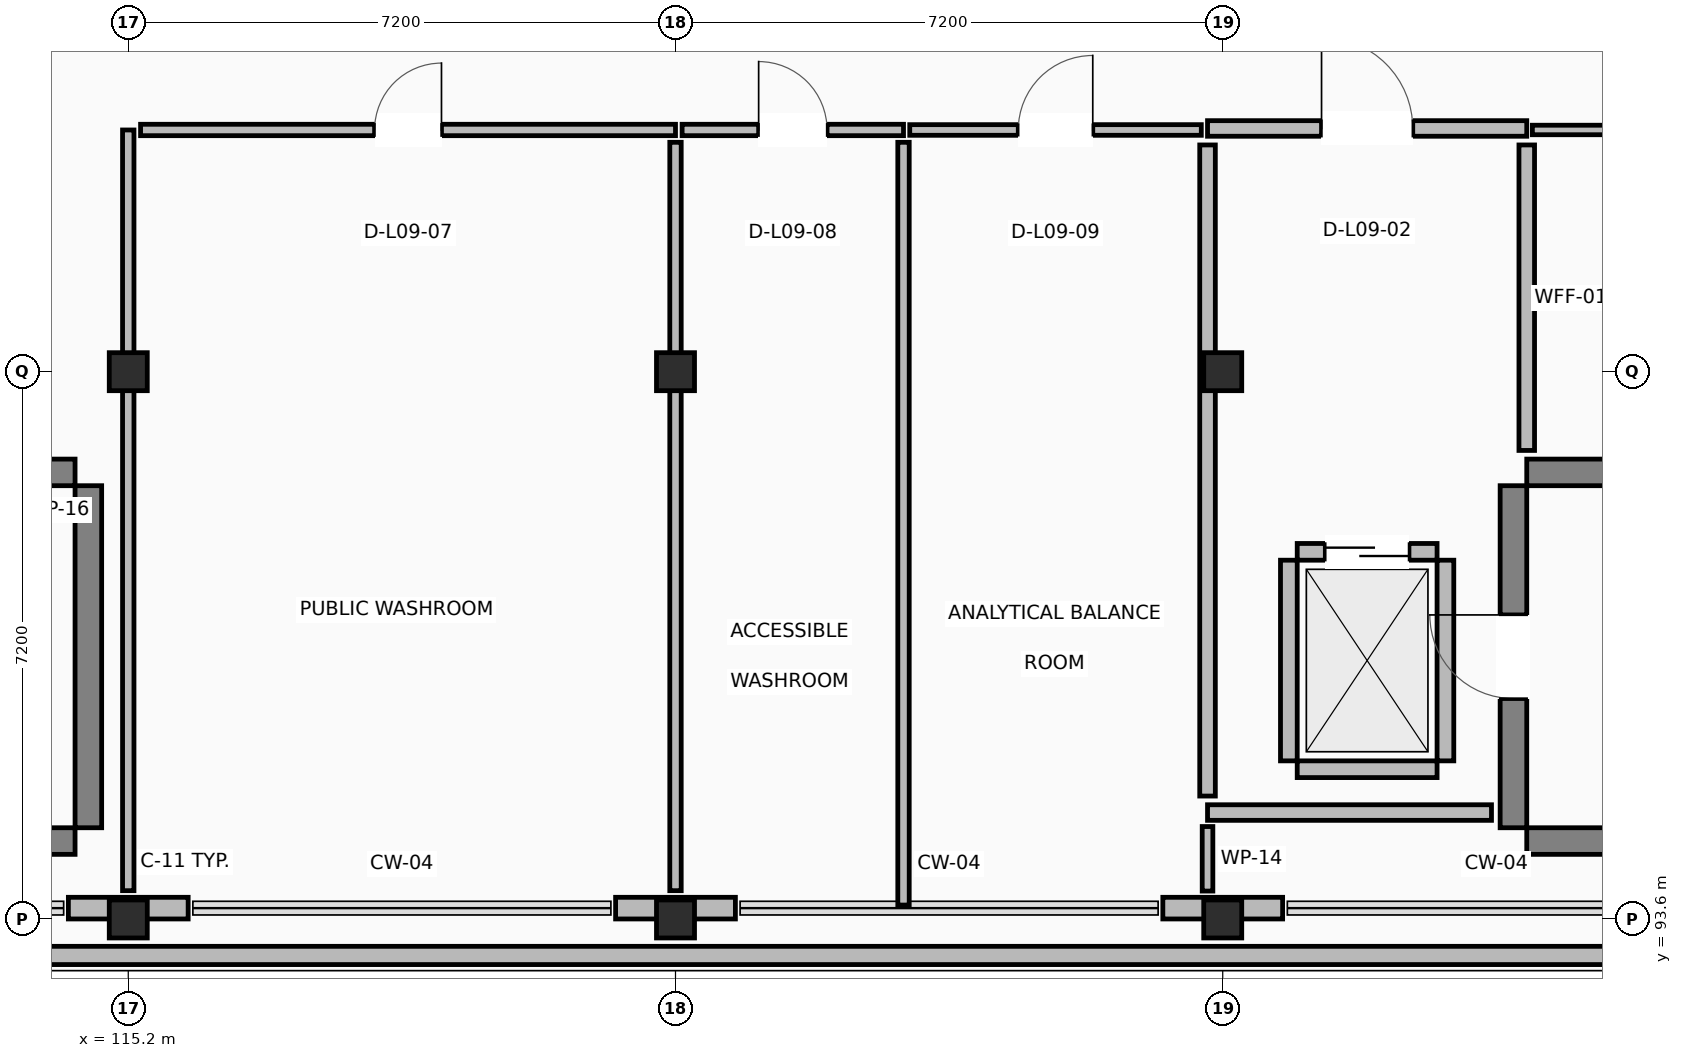
"""IFC4 building model, lengths in metres.
Left out: names, types, materials, properties, quantities, classifications, styles, units other than length and angle.
Written with IfcOpenShell. Run it as: python <this file> out.ifc"""

import sys

from ifc_helpers import new_model, si_unit, direction, frame, frame_2d, origin, origin_2d, place, context, subcontext, project, spatial, rectangle, extrude, element, fill, save


model = new_model("IFC4")
c1 = context("Model", 3, precision=1e-05, world=origin(), true_north=direction((0.0, 1.0)))
c2 = subcontext(c1, "Body", "Model", "MODEL_VIEW")
j1 = project(units=[si_unit("LENGTHUNIT", "METRE"), si_unit("PLANEANGLEUNIT", "RADIAN")], contexts=[c1])
p1 = place(None, origin())
s1 = spatial("IfcSite", under=j1, at=p1, CompositionType="ELEMENT")
p2 = place(p1, origin())
s2 = spatial("IfcBuilding", under=s1, at=p2, CompositionType="ELEMENT")
p3 = place(p2, frame((0.0, 0.0, 39.6)))
s3 = spatial("IfcBuildingStorey", under=s2, at=p3, CompositionType="ELEMENT", Elevation=39.6)
for number, where, z_axis, x_axis in (
    (1, (115.2, 93.6, 0.0), (0.0, 0.0, 1.0), (1.0, 0.0, 0.0)),
    (2, (115.2, 100.8, 0.0), (0.0, 0.0, 1.0), (1.0, 0.0, 0.0)),
    (3, (122.4, 93.6, 0.0), (0.0, 0.0, 1.0), (1.0, 0.0, 0.0)),
    (4, (122.4, 100.8, 0.0), (0.0, 0.0, 1.0), (1.0, 0.0, 0.0)),
    (5, (129.6, 93.6, 0.0), (0.0, 0.0, 1.0), (1.0, 0.0, 0.0)),
    (6, (129.6, 100.8, 0.0), (0.0, 0.0, 1.0), (1.0, 0.0, 0.0)),
):
    element("IfcColumn", number, at=place(p3, frame(where, z_axis=z_axis, x_axis=x_axis)), inside=s3, PredefinedType="COLUMN", context=c2, shape_type="SweptSolid", body=[
        extrude(rectangle(XDim=0.5, YDim=0.5, at=origin_2d()), origin(), (0.0, 0.0, 1.0), 3.92),
    ])
for number, where, z_axis, x_axis in (
    (7, (105.0, 94.625, 0.0), (0.0, 0.0, 1.0), (1.0, 0.0, 0.0)),
    (8, (105.0, 99.475, 0.0), (0.0, 0.0, 1.0), (1.0, 0.0, 0.0)),
):
    element("IfcWall", number, at=place(p3, frame(where, z_axis=z_axis, x_axis=x_axis)), inside=s3, PredefinedType="SHEAR", context=c2, shape_type="SweptSolid", body=[
        extrude(rectangle(XDim=9.5, YDim=0.35, at=frame_2d((4.75, 0.0))), origin(), (0.0, 0.0, 1.0), 3.92),
    ])
p4 = place(p3, frame((114.675, 94.8, 0.0), z_axis=(0.0, 0.0, 1.0), x_axis=(0.0, 1.0, 0.0)))
e9 = element("IfcWall", 9, at=p4, inside=s3, PredefinedType="SHEAR", context=c2, shape_type="SweptSolid", body=[
    extrude(rectangle(XDim=4.5, YDim=0.35, at=frame_2d((2.25, 0.0))), origin(), (0.0, 0.0, 1.0), 3.92),
])
for number, where, z_axis, x_axis in (
    (10, (133.6, 94.625, 0.0), (0.0, 0.0, 1.0), (1.0, 0.0, 0.0)),
    (11, (133.6, 99.475, 0.0), (0.0, 0.0, 1.0), (1.0, 0.0, 0.0)),
):
    element("IfcWall", number, at=place(p3, frame(where, z_axis=z_axis, x_axis=x_axis)), inside=s3, PredefinedType="SHEAR", context=c2, shape_type="SweptSolid", body=[
        extrude(rectangle(XDim=9.5, YDim=0.35, at=frame_2d((4.75, 0.0))), origin(), (0.0, 0.0, 1.0), 3.92),
    ])
p5 = place(p3, frame((133.425, 94.8, 0.0), z_axis=(0.0, 0.0, 1.0), x_axis=(0.0, 1.0, 0.0)))
e12 = element("IfcWall", 12, at=p5, inside=s3, PredefinedType="SHEAR", context=c2, shape_type="SweptSolid", body=[
    extrude(rectangle(XDim=4.5, YDim=0.35, at=frame_2d((2.25, 0.0))), origin(), (0.0, 0.0, 1.0), 3.92),
])
p6 = place(p5, frame((1.7, 0.0, 0.0)))
e13 = element("IfcOpeningElement", 13, at=p6, cuts=e12, PredefinedType="OPENING", context=c2, shape_type="SweptSolid", body=[
    extrude(rectangle(XDim=1.1, YDim=2.15, at=frame_2d((0.55, 1.075))), frame((0.0, 0.185, 0.0), z_axis=(0.0, -1.0, 0.0), x_axis=(1.0, 0.0, 0.0)), (0.0, 0.0, 1.0), 0.37),
])
for number, where, z_axis, x_axis in (
    (14, (114.412, 93.742, 0.0), (0.0, 0.0, 1.0), (1.0, 0.0, 0.0)),
    (15, (121.612, 93.742, 0.0), (0.0, 0.0, 1.0), (1.0, 0.0, 0.0)),
    (16, (128.812, 93.742, 0.0), (0.0, 0.0, 1.0), (1.0, 0.0, 0.0)),
):
    element("IfcWall", number, at=place(p3, frame(where, z_axis=z_axis, x_axis=x_axis)), inside=s3, PredefinedType="STANDARD", context=c2, shape_type="SweptSolid", body=[
        extrude(rectangle(XDim=1.576, YDim=0.285, at=frame_2d((0.788, 0.0))), origin(), (0.0, 0.0, 1.0), 2.96),
    ])
p7 = place(p3, frame((136.44, 93.12, 0.0), z_axis=(0.0, 0.0, 1.0), x_axis=(-1.0, 0.0, 0.0)))
e17 = element("IfcWall", 17, at=p7, inside=s3, PredefinedType="PARAPET", context=c2, shape_type="SweptSolid", body=[
    extrude(rectangle(XDim=42.28, YDim=0.24, at=frame_2d((21.14, 0.0))), origin(), (0.0, 0.0, 1.0), 1.12),
])
p8 = place(p3, frame((130.58, 95.57, 0.0), z_axis=(0.0, 0.0, 1.0), x_axis=(1.0, 0.0, 0.0)))
e18 = element("IfcWall", 18, at=p8, inside=s3, PredefinedType="STANDARD", context=c2, shape_type="SweptSolid", body=[
    extrude(rectangle(XDim=1.84, YDim=0.22, at=frame_2d((0.92, 0.0))), origin(), (0.0, 0.0, 1.0), 2.96),
])
p9 = place(p3, frame((130.58, 98.43, 0.0), z_axis=(0.0, 0.0, 1.0), x_axis=(1.0, 0.0, 0.0)))
e19 = element("IfcWall", 19, at=p9, inside=s3, PredefinedType="STANDARD", context=c2, shape_type="SweptSolid", body=[
    extrude(rectangle(XDim=1.84, YDim=0.22, at=frame_2d((0.92, 0.0))), origin(), (0.0, 0.0, 1.0), 2.96),
])
p10 = place(p9, frame((0.37, 0.0, 0.0)))
e20 = element("IfcOpeningElement", 20, at=p10, cuts=e19, PredefinedType="OPENING", context=c2, shape_type="SweptSolid", body=[
    extrude(rectangle(XDim=1.1, YDim=2.15, at=frame_2d((0.55, 1.075))), frame((0.0, 0.12, 0.0), z_axis=(0.0, -1.0, 0.0), x_axis=(1.0, 0.0, 0.0)), (0.0, 0.0, 1.0), 0.24),
])
for number, where, z_axis, x_axis in (
    (21, (130.47, 95.68, 0.0), (0.0, 0.0, 1.0), (0.0, 1.0, 0.0)),
    (22, (132.53, 95.68, 0.0), (0.0, 0.0, 1.0), (0.0, 1.0, 0.0)),
):
    element("IfcWall", number, at=place(p3, frame(where, z_axis=z_axis, x_axis=x_axis)), inside=s3, PredefinedType="STANDARD", context=c2, shape_type="SweptSolid", body=[
        extrude(rectangle(XDim=2.64, YDim=0.22, at=frame_2d((1.32, 0.0))), origin(), (0.0, 0.0, 1.0), 2.96),
    ])
p11 = place(p3, frame((129.4, 104.0, 0.0), z_axis=(0.0, 0.0, 1.0), x_axis=(1.0, 0.0, 0.0)))
e23 = element("IfcWall", 23, at=p11, inside=s3, PredefinedType="PARTITIONING", context=c2, shape_type="SweptSolid", body=[
    extrude(rectangle(XDim=4.2, YDim=0.205, at=frame_2d((2.1, 0.0))), origin(), (0.0, 0.0, 1.0), 2.96),
])
p12 = place(p11, frame((1.5, 0.0, 0.0)))
e24 = element("IfcOpeningElement", 24, at=p12, cuts=e23, PredefinedType="OPENING", context=c2, shape_type="SweptSolid", body=[
    extrude(rectangle(XDim=1.2, YDim=2.15, at=frame_2d((0.6, 1.075))), frame((0.0, 0.113, 0.0), z_axis=(0.0, -1.0, 0.0), x_axis=(1.0, 0.0, 0.0)), (0.0, 0.0, 1.0), 0.225),
])
p13 = place(p3, frame((133.6, 103.783, 0.0), z_axis=(0.0, 0.0, 1.0), x_axis=(0.0, -1.0, 0.0)))
e25 = element("IfcWall", 25, at=p13, inside=s3, PredefinedType="PARTITIONING", context=c2, shape_type="SweptSolid", body=[
    extrude(rectangle(XDim=4.019, YDim=0.205, at=frame_2d((2.01, 0.0))), origin(), (0.0, 0.0, 1.0), 2.96),
])
p14 = place(p3, frame((133.136, 95.0, 0.0), z_axis=(0.0, 0.0, 1.0), x_axis=(-1.0, 0.0, 0.0)))
e26 = element("IfcWall", 26, at=p14, inside=s3, PredefinedType="PARTITIONING", context=c2, shape_type="SweptSolid", body=[
    extrude(rectangle(XDim=3.736, YDim=0.205, at=frame_2d((1.868, 0.0))), origin(), (0.0, 0.0, 1.0), 2.96),
])
p15 = place(p3, frame((129.4, 95.217, 0.0), z_axis=(0.0, 0.0, 1.0), x_axis=(0.0, 1.0, 0.0)))
e27 = element("IfcWall", 27, at=p15, inside=s3, PredefinedType="PARTITIONING", context=c2, shape_type="SweptSolid", body=[
    extrude(rectangle(XDim=8.566, YDim=0.205, at=frame_2d((4.283, 0.0))), origin(), (0.0, 0.0, 1.0), 2.96),
])
p16 = place(p3, frame((115.2, 93.972, 0.0), z_axis=(0.0, 0.0, 1.0), x_axis=(0.0, 1.0, 0.0)))
e28 = element("IfcWall", 28, at=p16, inside=s3, PredefinedType="PARTITIONING", context=c2, shape_type="SweptSolid", body=[
    extrude(rectangle(XDim=10.008, YDim=0.15, at=frame_2d((5.004, 0.0))), origin(), (0.0, 0.0, 1.0), 2.96),
])
p17 = place(p3, frame((115.362, 103.98, 0.0), z_axis=(0.0, 0.0, 1.0), x_axis=(1.0, 0.0, 0.0)))
e29 = element("IfcWall", 29, at=p17, inside=s3, PredefinedType="PARTITIONING", context=c2, shape_type="SweptSolid", body=[
    extrude(rectangle(XDim=7.038, YDim=0.15, at=frame_2d((3.519, 0.0))), origin(), (0.0, 0.0, 1.0), 2.96),
])
p18 = place(p17, frame((3.079, 0.0, 0.0)))
e30 = element("IfcOpeningElement", 30, at=p18, cuts=e29, PredefinedType="OPENING", context=c2, shape_type="SweptSolid", body=[
    extrude(rectangle(XDim=0.88, YDim=2.1, at=frame_2d((0.44, 1.05))), frame((0.0, 0.085, 0.0), z_axis=(0.0, -1.0, 0.0), x_axis=(1.0, 0.0, 0.0)), (0.0, 0.0, 1.0), 0.17),
])
p19 = place(p3, frame((122.4, 103.818, 0.0), z_axis=(0.0, 0.0, 1.0), x_axis=(0.0, -1.0, 0.0)))
e31 = element("IfcWall", 31, at=p19, inside=s3, PredefinedType="PARTITIONING", context=c2, shape_type="SweptSolid", body=[
    extrude(rectangle(XDim=9.846, YDim=0.15, at=frame_2d((4.923, 0.0))), origin(), (0.0, 0.0, 1.0), 2.96),
])
p20 = place(p3, frame((122.487, 103.98, 0.0), z_axis=(0.0, 0.0, 1.0), x_axis=(1.0, 0.0, 0.0)))
e32 = element("IfcWall", 32, at=p20, inside=s3, PredefinedType="PARTITIONING", context=c2, shape_type="SweptSolid", body=[
    extrude(rectangle(XDim=2.913, YDim=0.15, at=frame_2d((1.457, 0.0))), origin(), (0.0, 0.0, 1.0), 2.96),
])
p21 = place(p20, frame((1.007, 0.0, 0.0)))
e33 = element("IfcOpeningElement", 33, at=p21, cuts=e32, PredefinedType="OPENING", context=c2, shape_type="SweptSolid", body=[
    extrude(rectangle(XDim=0.9, YDim=2.1, at=frame_2d((0.45, 1.05))), frame((0.0, 0.085, 0.0), z_axis=(0.0, -1.0, 0.0), x_axis=(1.0, 0.0, 0.0)), (0.0, 0.0, 1.0), 0.17),
])
p22 = place(p3, frame((125.4, 103.818, 0.0), z_axis=(0.0, 0.0, 1.0), x_axis=(0.0, -1.0, 0.0)))
e34 = element("IfcWall", 34, at=p22, inside=s3, PredefinedType="PARTITIONING", context=c2, shape_type="SweptSolid", body=[
    extrude(rectangle(XDim=10.035, YDim=0.15, at=frame_2d((5.018, 0.0))), origin(), (0.0, 0.0, 1.0), 2.96),
])
p23 = place(p3, frame((125.482, 103.98, 0.0), z_axis=(0.0, 0.0, 1.0), x_axis=(1.0, 0.0, 0.0)))
e35 = element("IfcWall", 35, at=p23, inside=s3, PredefinedType="PARTITIONING", context=c2, shape_type="SweptSolid", body=[
    extrude(rectangle(XDim=3.836, YDim=0.14, at=frame_2d((1.918, 0.0))), origin(), (0.0, 0.0, 1.0), 2.96),
])
p24 = place(p23, frame((1.428, 0.0, 0.0)))
e36 = element("IfcOpeningElement", 36, at=p24, cuts=e35, PredefinedType="OPENING", context=c2, shape_type="SweptSolid", body=[
    extrude(rectangle(XDim=0.98, YDim=2.1, at=frame_2d((0.49, 1.05))), frame((0.0, 0.08, 0.0), z_axis=(0.0, -1.0, 0.0), x_axis=(1.0, 0.0, 0.0)), (0.0, 0.0, 1.0), 0.16),
])
p25 = place(p3, frame((129.4, 94.816, 0.0), z_axis=(0.0, 0.0, 1.0), x_axis=(0.0, -1.0, 0.0)))
e37 = element("IfcWall", 37, at=p25, inside=s3, PredefinedType="PARTITIONING", context=c2, shape_type="SweptSolid", body=[
    extrude(rectangle(XDim=0.849, YDim=0.14, at=frame_2d((0.424, 0.0))), origin(), (0.0, 0.0, 1.0), 2.96),
])
p26 = place(p3, frame((133.674, 103.98, 0.0), z_axis=(0.0, 0.0, 1.0), x_axis=(1.0, 0.0, 0.0)))
e38 = element("IfcWall", 38, at=p26, inside=s3, PredefinedType="PARTITIONING", context=c2, shape_type="SweptSolid", body=[
    extrude(rectangle(XDim=11.306, YDim=0.125, at=frame_2d((5.653, 0.0))), origin(), (0.0, 0.0, 1.0), 2.96),
])
p27 = place(p26, frame((5.183, 0.0, 0.0)))
e39 = element("IfcOpeningElement", 39, at=p27, cuts=e38, PredefinedType="OPENING", context=c2, shape_type="SweptSolid", body=[
    extrude(rectangle(XDim=0.94, YDim=2.1, at=frame_2d((0.47, 1.05))), frame((0.0, 0.073, 0.0), z_axis=(0.0, -1.0, 0.0), x_axis=(1.0, 0.0, 0.0)), (0.0, 0.0, 1.0), 0.145),
])
p28 = place(p6, origin())
e40 = element("IfcDoor", 40, at=p28, inside=s3, OperationType="SINGLE_SWING_RIGHT", PredefinedType="DOOR", context=c2, shape_type="SweptSolid", body=[
    extrude(rectangle(XDim=1.1, YDim=2.15, at=frame_2d((0.55, 1.075))), frame((0.0, 0.025, 0.0), z_axis=(0.0, -1.0, 0.0), x_axis=(1.0, 0.0, 0.0)), (0.0, 0.0, 1.0), 0.05),
])
fill(e13, e40)
p29 = place(p10, origin())
e41 = element("IfcDoor", 41, at=p29, inside=s3, OperationType="SLIDING_TO_RIGHT", PredefinedType="DOOR", context=c2, shape_type="SweptSolid", body=[
    extrude(rectangle(XDim=1.1, YDim=2.15, at=frame_2d((0.55, 1.075))), frame((0.0, 0.025, 0.0), z_axis=(0.0, -1.0, 0.0), x_axis=(1.0, 0.0, 0.0)), (0.0, 0.0, 1.0), 0.05),
])
fill(e20, e41)
p30 = place(p12, origin())
e42 = element("IfcDoor", 42, at=p30, inside=s3, OperationType="SINGLE_SWING_LEFT", PredefinedType="DOOR", context=c2, shape_type="SweptSolid", body=[
    extrude(rectangle(XDim=1.2, YDim=2.15, at=frame_2d((0.6, 1.075))), frame((0.0, 0.025, 0.0), z_axis=(0.0, -1.0, 0.0), x_axis=(1.0, 0.0, 0.0)), (0.0, 0.0, 1.0), 0.05),
])
fill(e24, e42)
p31 = place(p18, origin())
e43 = element("IfcDoor", 43, at=p31, inside=s3, OperationType="SINGLE_SWING_RIGHT", PredefinedType="DOOR", context=c2, shape_type="SweptSolid", body=[
    extrude(rectangle(XDim=0.88, YDim=2.1, at=frame_2d((0.44, 1.05))), frame((0.0, 0.025, 0.0), z_axis=(0.0, -1.0, 0.0), x_axis=(1.0, 0.0, 0.0)), (0.0, 0.0, 1.0), 0.05),
])
fill(e30, e43)
p32 = place(p21, origin())
e44 = element("IfcDoor", 44, at=p32, inside=s3, OperationType="SINGLE_SWING_LEFT", PredefinedType="DOOR", context=c2, shape_type="SweptSolid", body=[
    extrude(rectangle(XDim=0.9, YDim=2.1, at=frame_2d((0.45, 1.05))), frame((0.0, 0.025, 0.0), z_axis=(0.0, -1.0, 0.0), x_axis=(1.0, 0.0, 0.0)), (0.0, 0.0, 1.0), 0.05),
])
fill(e33, e44)
p33 = place(p24, origin())
e45 = element("IfcDoor", 45, at=p33, inside=s3, OperationType="SINGLE_SWING_RIGHT", PredefinedType="DOOR", context=c2, shape_type="SweptSolid", body=[
    extrude(rectangle(XDim=0.98, YDim=2.1, at=frame_2d((0.49, 1.05))), frame((0.0, 0.025, 0.0), z_axis=(0.0, -1.0, 0.0), x_axis=(1.0, 0.0, 0.0)), (0.0, 0.0, 1.0), 0.05),
])
fill(e36, e45)
save(model, sys.argv[1])
